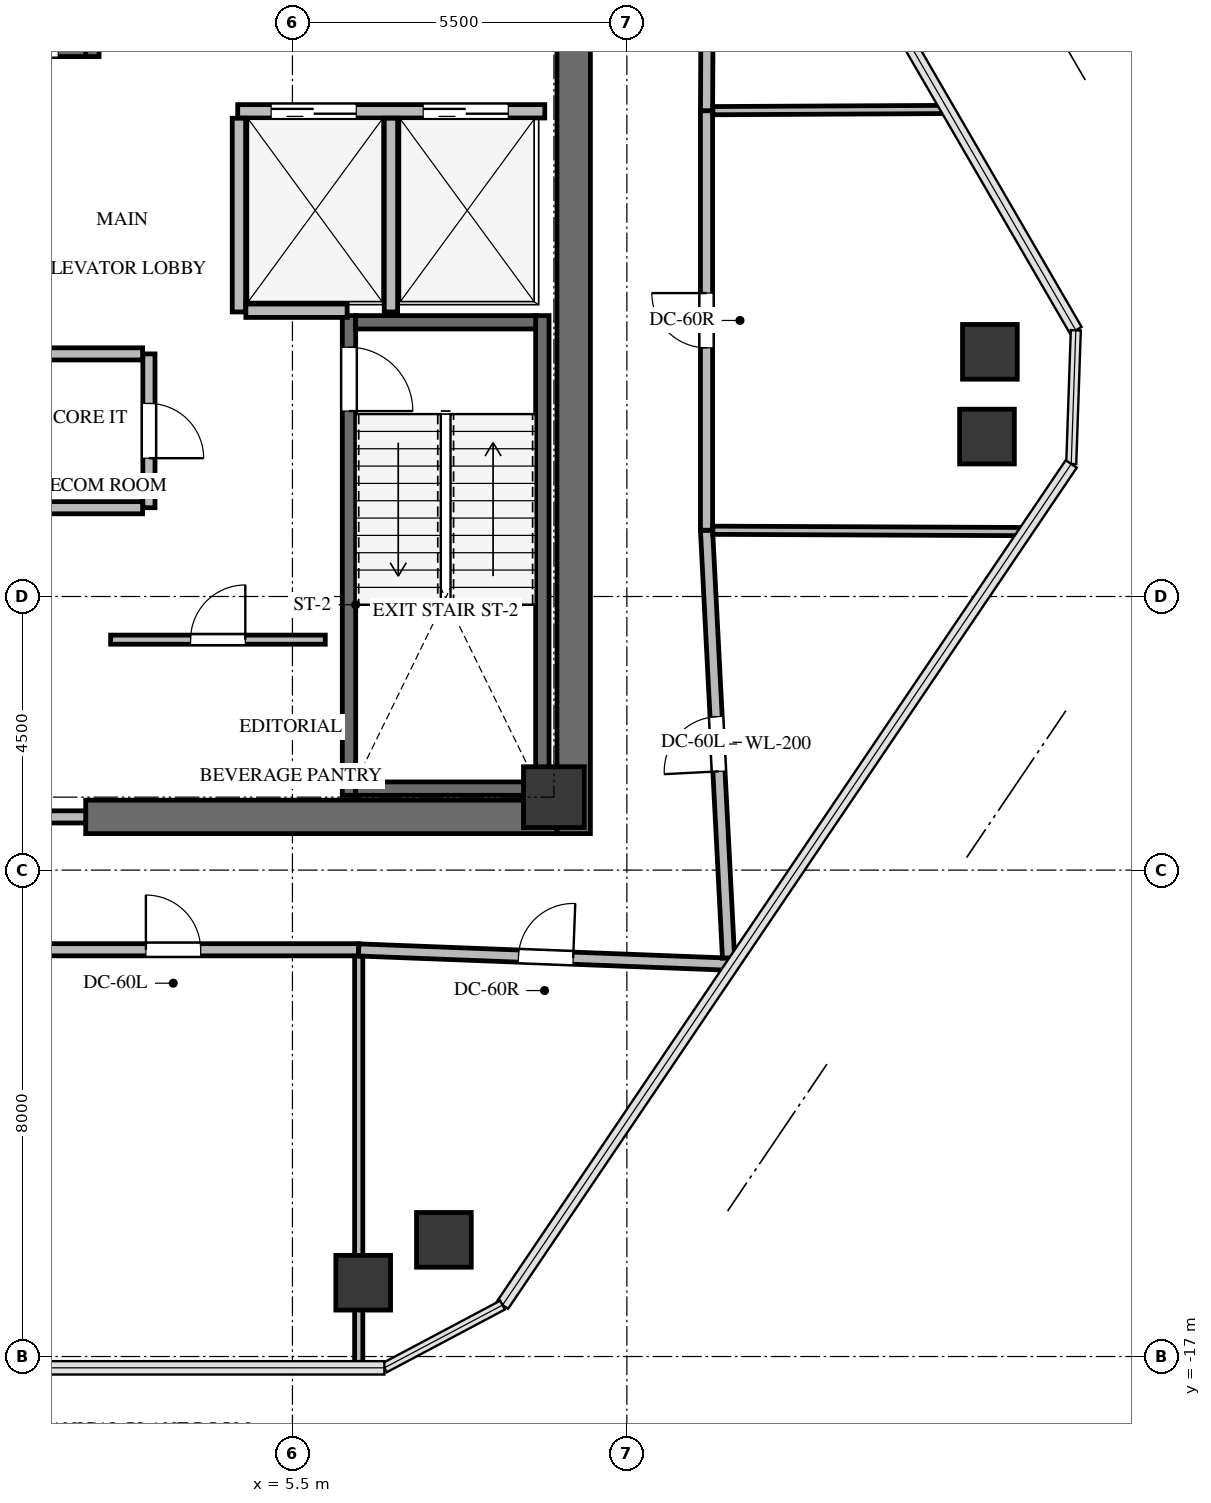
"""IFC4 building model, lengths in metres.
Left out: names, types, materials, properties, quantities, classifications, styles, units other than length and angle.
Written with IfcOpenShell. Run it as: python <this file> out.ifc"""

import sys

from ifc_helpers import new_model, si_unit, direction, frame, frame_2d, origin, origin_2d, place, context, subcontext, project, spatial, rectangle, extrude, source, transform, mapped, element, fill, save


model = new_model("IFC4")
c1 = context("Model", 3, precision=1e-05, world=origin(), true_north=direction((0.0, 1.0)))
c2 = subcontext(c1, "Body", "Model", "MODEL_VIEW")
j1 = project(units=[si_unit("LENGTHUNIT", "METRE"), si_unit("PLANEANGLEUNIT", "RADIAN")], contexts=[c1])
p1 = place(None, origin())
s1 = spatial("IfcSite", under=j1, at=p1, CompositionType="ELEMENT")
p2 = place(p1, origin())
s2 = spatial("IfcBuilding", under=s1, at=p2, CompositionType="ELEMENT")
p3 = place(p2, frame((0.0, 0.0, 268.3)))
s3 = spatial("IfcBuildingStorey", under=s2, at=p3, CompositionType="ELEMENT", Elevation=268.3)
p4 = place(p3, frame((10.125, -8.4, 0.0), z_axis=(0.0, 0.0, 1.0), x_axis=(0.0, 1.0, 0.0)))
e1 = element("IfcWall", 1, at=p4, inside=s3, PredefinedType="SHEAR", context=c2, shape_type="SweptSolid", body=[
    extrude(rectangle(XDim=16.8, YDim=0.55, at=frame_2d((8.4, 0.0))), origin(), (0.0, 0.0, 1.0), 4.2),
])
p5 = place(p3, frame((2.1, -8.125, 0.0), z_axis=(0.0, 0.0, 1.0), x_axis=(1.0, 0.0, 0.0)))
e2 = element("IfcWall", 2, at=p5, inside=s3, PredefinedType="SHEAR", context=c2, shape_type="SweptSolid", body=[
    extrude(rectangle(XDim=7.75, YDim=0.55, at=frame_2d((3.875, 0.0))), origin(), (0.0, 0.0, 1.0), 4.2),
])
p6 = place(p3, frame((9.61, -7.77, -0.3), z_axis=(0.0, 0.0, 1.0), x_axis=(0.0, 1.0, 0.0)))
e3 = element("IfcWall", 3, at=p6, inside=s3, PredefinedType="SHEAR", context=c2, shape_type="SweptSolid", body=[
    extrude(rectangle(XDim=7.89, YDim=0.22, at=frame_2d((3.945, 0.0))), origin(), (0.0, 0.0, 1.0), 4.05),
])
p7 = place(p3, frame((6.43, 0.12, -0.3), z_axis=(0.0, 0.0, 1.0), x_axis=(0.0, -1.0, 0.0)))
e4 = element("IfcWall", 4, at=p7, inside=s3, PredefinedType="SHEAR", context=c2, shape_type="SweptSolid", body=[
    extrude(rectangle(XDim=7.89, YDim=0.22, at=frame_2d((3.945, 0.0))), origin(), (0.0, 0.0, 1.0), 4.05),
])
p8 = place(p7, frame((0.52, 0.0, 0.0)))
e5 = element("IfcOpeningElement", 5, at=p8, cuts=e4, PredefinedType="OPENING", context=c2, shape_type="SweptSolid", body=[
    extrude(rectangle(XDim=1.05, YDim=2.15, at=frame_2d((0.525, 1.075))), frame((0.0, 0.12, 0.0), z_axis=(0.0, -1.0, 0.0), x_axis=(1.0, 0.0, 0.0)), (0.0, 0.0, 1.0), 0.24),
])
for number, where, z_axis, x_axis in (
    (6, (6.54, -7.66, -0.3), (0.0, 0.0, 1.0), (1.0, 0.0, 0.0)),
    (7, (9.5, 0.01, -0.3), (0.0, 0.0, 1.0), (-1.0, 0.0, 0.0)),
):
    element("IfcWall", number, at=place(p3, frame(where, z_axis=z_axis, x_axis=x_axis)), inside=s3, PredefinedType="SHEAR", context=c2, shape_type="SweptSolid", body=[
        extrude(rectangle(XDim=2.96, YDim=0.22, at=frame_2d((1.48, 0.0))), origin(), (0.0, 0.0, 1.0), 4.05),
    ])
p9 = place(p3, frame((2.21, 4.38, -0.3), z_axis=(0.0, 0.0, 1.0), x_axis=(0.0, 1.0, 0.0)))
e8 = element("IfcWall", 8, at=p9, inside=s3, PredefinedType="SHEAR", context=c2, shape_type="SweptSolid", body=[
    extrude(rectangle(XDim=3.4, YDim=0.22, at=frame_2d((1.7, 0.0))), origin(), (0.0, 0.0, 1.0), 4.05),
])
p10 = place(p3, frame((-5.25, 4.49, -0.3), z_axis=(0.0, 0.0, 1.0), x_axis=(1.0, 0.0, 0.0)))
e9 = element("IfcWall", 9, at=p10, inside=s3, PredefinedType="SHEAR", context=c2, shape_type="SweptSolid", body=[
    extrude(rectangle(XDim=7.35, YDim=0.22, at=frame_2d((3.675, 0.0))), origin(), (0.0, 0.0, 1.0), 4.05),
])
p11 = place(p10, frame((5.85, 0.0, 0.0)))
e10 = element("IfcOpeningElement", 10, at=p11, cuts=e9, PredefinedType="OPENING", context=c2, shape_type="SweptSolid", body=[
    extrude(rectangle(XDim=1.05, YDim=2.15, at=frame_2d((0.525, 1.075))), frame((0.0, 0.12, 0.0), z_axis=(0.0, -1.0, 0.0), x_axis=(1.0, 0.0, 0.0)), (0.0, 0.0, 1.0), 0.24),
])
m1 = source(origin(), c2, "Body", "SweptSolid", [
    extrude(rectangle(XDim=1.0, YDim=1.0, at=origin_2d()), origin(), (0.0, 0.0, 1.0), 4.05),
])
p12 = place(p3, frame((9.8, -7.8, -0.3), z_axis=(0.0, 0.0, 1.0), x_axis=(1.0, 0.0, 0.0)))
e11 = element("IfcColumn", 11, at=p12, inside=s3, PredefinedType="COLUMN", context=c2, shape_type="MappedRepresentation", body=[
    mapped(m1, transform((0.0, 0.0, 0.0), x_axis=(1.0, 0.0, 0.0), y_axis=(0.0, 1.0, 0.0), z_axis=(0.0, 0.0, 1.0), scale=1.0)),
])
m2 = source(origin(), c2, "Body", "SweptSolid", [
    extrude(rectangle(XDim=0.9, YDim=0.9, at=origin_2d()), origin(), (0.0, 0.0, 1.0), 4.05),
])
for number, where, z_axis, x_axis in (
    (12, (16.97, -0.476, -0.3), (0.0, 0.0, 1.0), (1.0, 0.0, 0.0)),
    (13, (16.922, -1.87, -0.3), (0.0, 0.0, 1.0), (1.0, 0.0, 0.0)),
    (14, (7.991, -15.081, -0.3), (0.0, 0.0, 1.0), (1.0, 0.0, 0.0)),
    (15, (6.664, -15.786, -0.3), (0.0, 0.0, 1.0), (1.0, 0.0, 0.0)),
):
    element("IfcColumn", number, at=place(p3, frame(where, z_axis=z_axis, x_axis=x_axis)), inside=s3, PredefinedType="COLUMN", context=c2, shape_type="MappedRepresentation", body=[
        mapped(m2, transform((0.0, 0.0, 0.0), x_axis=(1.0, 0.0, 0.0), y_axis=(0.0, 1.0, 0.0), z_axis=(0.0, 0.0, 1.0), scale=1.0)),
    ])
p13 = place(p3, frame((-2.1, -8.125, 0.0), z_axis=(0.0, 0.0, 1.0), x_axis=(1.0, 0.0, 0.0)))
e16 = element("IfcWall", 16, at=p13, inside=s3, PredefinedType="SOLIDWALL", context=c2, shape_type="SweptSolid", body=[
    extrude(rectangle(XDim=4.2, YDim=0.2, at=frame_2d((2.1, 0.0))), origin(), (0.0, 0.0, 1.0), 3.735),
])
p14 = place(p13, frame((1.2, 0.0, 0.0)))
e17 = element("IfcOpeningElement", 17, at=p14, cuts=e16, PredefinedType="OPENING", context=c2, shape_type="SweptSolid", body=[
    extrude(rectangle(XDim=1.8, YDim=2.15, at=frame_2d((0.9, 1.075))), frame((0.0, 0.11, 0.0), z_axis=(0.0, -1.0, 0.0), x_axis=(1.0, 0.0, 0.0)), (0.0, 0.0, 1.0), 0.22),
])
p15 = place(p3, frame((4.6, 3.48, 0.0), z_axis=(0.0, 0.0, 1.0), x_axis=(1.0, 0.0, 0.0)))
e18 = element("IfcWall", 18, at=p15, inside=s3, PredefinedType="SOLIDWALL", context=c2, shape_type="SweptSolid", body=[
    extrude(rectangle(XDim=5.05, YDim=0.22, at=frame_2d((2.525, 0.0))), origin(), (0.0, 0.0, 1.0), 3.735),
])
p16 = place(p15, frame((0.55, 0.0, 0.0)))
e19 = element("IfcOpeningElement", 19, at=p16, cuts=e18, PredefinedType="OPENING", context=c2, shape_type="SweptSolid", body=[
    extrude(rectangle(XDim=1.4, YDim=2.15, at=frame_2d((0.7, 1.075))), frame((0.0, 0.12, 0.0), z_axis=(0.0, -1.0, 0.0), x_axis=(1.0, 0.0, 0.0)), (0.0, 0.0, 1.0), 0.24),
])
p17 = place(p15, frame((3.05, 0.0, 0.0)))
e20 = element("IfcOpeningElement", 20, at=p17, cuts=e18, PredefinedType="OPENING", context=c2, shape_type="SweptSolid", body=[
    extrude(rectangle(XDim=1.4, YDim=2.15, at=frame_2d((0.7, 1.075))), frame((0.0, 0.12, 0.0), z_axis=(0.0, -1.0, 0.0), x_axis=(1.0, 0.0, 0.0)), (0.0, 0.0, 1.0), 0.24),
])
for number, where, z_axis, x_axis in (
    (21, (4.62, 0.18, 0.0), (0.0, 0.0, 1.0), (0.0, 1.0, 0.0)),
    (22, (7.12, 0.18, 0.0), (0.0, 0.0, 1.0), (0.0, 1.0, 0.0)),
):
    element("IfcWall", number, at=place(p3, frame(where, z_axis=z_axis, x_axis=x_axis)), inside=s3, PredefinedType="SOLIDWALL", context=c2, shape_type="SweptSolid", body=[
        extrude(rectangle(XDim=3.186, YDim=0.22, at=frame_2d((1.593, 0.0))), origin(), (0.0, 0.0, 1.0), 3.735),
    ])
p18 = place(p3, frame((4.734, 0.2, 0.0), z_axis=(0.0, 0.0, 1.0), x_axis=(1.0, 0.0, 0.0)))
e23 = element("IfcWall", 23, at=p18, inside=s3, PredefinedType="SOLIDWALL", context=c2, shape_type="SweptSolid", body=[
    extrude(rectangle(XDim=1.666, YDim=0.22, at=frame_2d((0.833, 0.0))), origin(), (0.0, 0.0, 1.0), 3.735),
])
p19 = place(p3, frame((2.51, -5.21, 0.0), z_axis=(0.0, 0.0, 1.0), x_axis=(1.0, 0.0, 0.0)))
e24 = element("IfcWall", 24, at=p19, inside=s3, PredefinedType="PARTITIONING", context=c2, shape_type="SweptSolid", body=[
    extrude(rectangle(XDim=3.53, YDim=0.15, at=frame_2d((1.765, 0.0))), origin(), (0.0, 0.0, 1.0), 3.735),
])
p20 = place(p19, frame((1.315, 0.0, 0.0)))
e25 = element("IfcOpeningElement", 25, at=p20, cuts=e24, PredefinedType="OPENING", context=c2, shape_type="SweptSolid", body=[
    extrude(rectangle(XDim=0.9, YDim=2.05, at=frame_2d((0.45, 1.025))), frame((0.0, 0.085, 0.0), z_axis=(0.0, -1.0, 0.0), x_axis=(1.0, 0.0, 0.0)), (0.0, 0.0, 1.0), 0.17),
])
p21 = place(p3, frame((3.14, -0.51, 0.0), z_axis=(0.0, 0.0, 1.0), x_axis=(0.0, -1.0, 0.0)))
e26 = element("IfcWall", 26, at=p21, inside=s3, PredefinedType="SOLIDWALL", context=c2, shape_type="SweptSolid", body=[
    extrude(rectangle(XDim=2.53, YDim=0.2, at=frame_2d((1.265, 0.0))), origin(), (0.0, 0.0, 1.0), 3.735),
])
p22 = place(p21, frame((0.815, 0.0, 0.0)))
e27 = element("IfcOpeningElement", 27, at=p22, cuts=e26, PredefinedType="OPENING", context=c2, shape_type="SweptSolid", body=[
    extrude(rectangle(XDim=0.9, YDim=2.05, at=frame_2d((0.45, 1.025))), frame((0.0, 0.11, 0.0), z_axis=(0.0, -1.0, 0.0), x_axis=(1.0, 0.0, 0.0)), (0.0, 0.0, 1.0), 0.22),
])
for number, where, z_axis, x_axis in (
    (28, (3.036, -3.04, 0.0), (0.0, 0.0, 1.0), (-1.0, 0.0, 0.0)),
    (29, (1.21, -0.51, 0.0), (0.0, 0.0, 1.0), (1.0, 0.0, 0.0)),
):
    element("IfcWall", number, at=place(p3, frame(where, z_axis=z_axis, x_axis=x_axis)), inside=s3, PredefinedType="SOLIDWALL", context=c2, shape_type="SweptSolid", body=[
        extrude(rectangle(XDim=1.826, YDim=0.2, at=frame_2d((0.913, 0.0))), origin(), (0.0, 0.0, 1.0), 3.735),
    ])
p23 = place(p3, frame((0.49, -10.31, 0.0), z_axis=(0.0, 0.0, 1.0), x_axis=(1.0, 0.0, 0.0)))
e30 = element("IfcWall", 30, at=p23, inside=s3, PredefinedType="SOLIDWALL", context=c2, shape_type="SweptSolid", body=[
    extrude(rectangle(XDim=6.1, YDim=0.2, at=frame_2d((3.05, 0.0))), origin(), (0.0, 0.0, 1.0), 2.32),
])
p24 = place(p23, frame((2.6, 0.0, 0.0)))
e31 = element("IfcOpeningElement", 31, at=p24, cuts=e30, PredefinedType="OPENING", context=c2, shape_type="SweptSolid", body=[
    extrude(rectangle(XDim=0.9, YDim=2.05, at=frame_2d((0.45, 1.025))), frame((0.0, 0.11, 0.0), z_axis=(0.0, -1.0, 0.0), x_axis=(1.0, 0.0, 0.0)), (0.0, 0.0, 1.0), 0.22),
])
p25 = place(p3, frame((6.59, -10.313, 0.0), z_axis=(0.0, 0.0, 1.0), x_axis=(0.999261994152, -0.038411808645, 0.0)))
e32 = element("IfcWall", 32, at=p25, inside=s3, PredefinedType="SOLIDWALL", context=c2, shape_type="SweptSolid", body=[
    extrude(rectangle(XDim=6.159, YDim=0.2, at=frame_2d((3.08, 0.0))), origin(), (0.0, 0.0, 1.0), 2.32),
])
p26 = place(p25, frame((2.629, 0.0, 0.0)))
e33 = element("IfcOpeningElement", 33, at=p26, cuts=e32, PredefinedType="OPENING", context=c2, shape_type="SweptSolid", body=[
    extrude(rectangle(XDim=0.9, YDim=2.05, at=frame_2d((0.45, 1.025))), frame((0.0, 0.11, 0.0), z_axis=(0.0, -1.0, 0.0), x_axis=(1.0, 0.0, 0.0)), (0.0, 0.0, 1.0), 0.22),
])
p27 = place(p3, frame((12.672, -10.443, 0.0), z_axis=(0.0, 0.0, 1.0), x_axis=(-0.051414240227, 0.998677413333, 0.0)))
e34 = element("IfcWall", 34, at=p27, inside=s3, PredefinedType="SOLIDWALL", context=c2, shape_type="SweptSolid", body=[
    extrude(rectangle(XDim=7.042, YDim=0.2, at=frame_2d((3.521, 0.0))), origin(), (0.0, 0.0, 1.0), 2.32),
])
p28 = place(p27, frame((3.071, 0.0, 0.0)))
e35 = element("IfcOpeningElement", 35, at=p28, cuts=e34, PredefinedType="OPENING", context=c2, shape_type="SweptSolid", body=[
    extrude(rectangle(XDim=0.9, YDim=2.05, at=frame_2d((0.45, 1.025))), frame((0.0, 0.11, 0.0), z_axis=(0.0, -1.0, 0.0), x_axis=(1.0, 0.0, 0.0)), (0.0, 0.0, 1.0), 0.22),
])
p29 = place(p3, frame((12.31, -3.41, 0.0), z_axis=(0.0, 0.0, 1.0), x_axis=(0.0, 1.0, 0.0)))
e36 = element("IfcWall", 36, at=p29, inside=s3, PredefinedType="SOLIDWALL", context=c2, shape_type="SweptSolid", body=[
    extrude(rectangle(XDim=6.9, YDim=0.2, at=frame_2d((3.45, 0.0))), origin(), (0.0, 0.0, 1.0), 3.093),
])
p30 = place(p29, frame((3.0, 0.0, 0.0)))
e37 = element("IfcOpeningElement", 37, at=p30, cuts=e36, PredefinedType="OPENING", context=c2, shape_type="SweptSolid", body=[
    extrude(rectangle(XDim=0.9, YDim=2.05, at=frame_2d((0.45, 1.025))), frame((0.0, 0.11, 0.0), z_axis=(0.0, -1.0, 0.0), x_axis=(1.0, 0.0, 0.0)), (0.0, 0.0, 1.0), 0.22),
])
p31 = place(p3, frame((12.31, 3.49, 0.0), z_axis=(0.0, 0.0, 1.0), x_axis=(0.005031021246, 0.999987344333, 0.0)))
e38 = element("IfcWall", 38, at=p31, inside=s3, PredefinedType="SOLIDWALL", context=c2, shape_type="SweptSolid", body=[
    extrude(rectangle(XDim=6.794, YDim=0.2, at=frame_2d((3.397, 0.0))), origin(), (0.0, 0.0, 1.0), 2.32),
])
p32 = place(p31, frame((2.947, 0.0, 0.0)))
e39 = element("IfcOpeningElement", 39, at=p32, cuts=e38, PredefinedType="OPENING", context=c2, shape_type="SweptSolid", body=[
    extrude(rectangle(XDim=0.9, YDim=2.05, at=frame_2d((0.45, 1.025))), frame((0.0, 0.11, 0.0), z_axis=(0.0, -1.0, 0.0), x_axis=(1.0, 0.0, 0.0)), (0.0, 0.0, 1.0), 0.22),
])
p33 = place(p3, frame((6.59, -10.417, 0.0), z_axis=(0.0, 0.0, 1.0), x_axis=(0.0, -1.0, 0.0)))
e40 = element("IfcWall", 40, at=p33, inside=s3, PredefinedType="PARTITIONING", context=c2, shape_type="SweptSolid", body=[
    extrude(rectangle(XDim=6.769, YDim=0.135, at=frame_2d((3.384, 0.0))), origin(), (0.0, 0.0, 1.0), 2.32),
])
p34 = place(p3, frame((12.744, -10.55, 0.0), z_axis=(0.0, 0.0, 1.0), x_axis=(0.56006489544, 0.828448738846, 0.0)))
e41 = element("IfcWall", 41, at=p34, inside=s3, PredefinedType="PARTITIONING", context=c2, shape_type="SweptSolid", body=[
    extrude(rectangle(XDim=0.262, YDim=0.135, at=frame_2d((0.131, 0.0))), origin(), (0.0, 0.0, 1.0), 3.735),
])
p35 = place(p3, frame((12.414, -3.41, 0.0), z_axis=(0.0, 0.0, 1.0), x_axis=(0.999990868706, -0.004273465251, 0.0)))
e42 = element("IfcWall", 42, at=p35, inside=s3, PredefinedType="PARTITIONING", context=c2, shape_type="SweptSolid", body=[
    extrude(rectangle(XDim=5.142, YDim=0.135, at=frame_2d((2.571, 0.0))), origin(), (0.0, 0.0, 1.0), 2.32),
])
p36 = place(p3, frame((12.414, 3.49, 0.0), z_axis=(0.0, 0.0, 1.0), x_axis=(0.999987207709, 0.005058104237, 0.0)))
e43 = element("IfcWall", 43, at=p36, inside=s3, PredefinedType="PARTITIONING", context=c2, shape_type="SweptSolid", body=[
    extrude(rectangle(XDim=3.861, YDim=0.135, at=frame_2d((1.931, 0.0))), origin(), (0.0, 0.0, 1.0), 2.32),
])
m3 = source(origin(), c2, "Body", "SweptSolid", [
    extrude(rectangle(XDim=1.05, YDim=2.15, at=frame_2d((0.525, 1.075))), frame((0.0, 0.025, 0.0), z_axis=(0.0, -1.0, 0.0), x_axis=(1.0, 0.0, 0.0)), (0.0, 0.0, 1.0), 0.05),
])
p37 = place(p8, origin())
e44 = element("IfcDoor", 44, at=p37, inside=s3, OperationType="SINGLE_SWING_RIGHT", PredefinedType="DOOR", context=c2, shape_type="MappedRepresentation", body=[
    mapped(m3, transform((0.0, 0.0, 0.0), x_axis=(1.0, 0.0, 0.0), y_axis=(0.0, 1.0, 0.0), z_axis=(0.0, 0.0, 1.0), scale=1.0)),
])
fill(e5, e44)
m4 = source(origin(), c2, "Body", "SweptSolid", [
    extrude(rectangle(XDim=1.4, YDim=2.15, at=frame_2d((0.7, 1.075))), frame((0.0, 0.025, 0.0), z_axis=(0.0, -1.0, 0.0), x_axis=(1.0, 0.0, 0.0)), (0.0, 0.0, 1.0), 0.05),
])
p38 = place(p16, origin())
e45 = element("IfcDoor", 45, at=p38, inside=s3, OperationType="DOUBLE_DOOR_SLIDING", PredefinedType="DOOR", context=c2, shape_type="MappedRepresentation", body=[
    mapped(m4, transform((0.0, 0.0, 0.0), x_axis=(1.0, 0.0, 0.0), y_axis=(0.0, 1.0, 0.0), z_axis=(0.0, 0.0, 1.0), scale=1.0)),
])
fill(e19, e45)
p39 = place(p17, origin())
e46 = element("IfcDoor", 46, at=p39, inside=s3, OperationType="DOUBLE_DOOR_SLIDING", PredefinedType="DOOR", context=c2, shape_type="MappedRepresentation", body=[
    mapped(m4, transform((0.0, 0.0, 0.0), x_axis=(1.0, 0.0, 0.0), y_axis=(0.0, 1.0, 0.0), z_axis=(0.0, 0.0, 1.0), scale=1.0)),
])
fill(e20, e46)
m5 = source(origin(), c2, "Body", "SweptSolid", [
    extrude(rectangle(XDim=0.9, YDim=2.05, at=frame_2d((0.45, 1.025))), frame((0.0, 0.025, 0.0), z_axis=(0.0, -1.0, 0.0), x_axis=(1.0, 0.0, 0.0)), (0.0, 0.0, 1.0), 0.05),
])
p40 = place(p20, origin())
e47 = element("IfcDoor", 47, at=p40, inside=s3, OperationType="SINGLE_SWING_RIGHT", PredefinedType="DOOR", context=c2, shape_type="MappedRepresentation", body=[
    mapped(m5, transform((0.0, 0.0, 0.0), x_axis=(1.0, 0.0, 0.0), y_axis=(0.0, 1.0, 0.0), z_axis=(0.0, 0.0, 1.0), scale=1.0)),
])
fill(e25, e47)
p41 = place(p22, origin())
e48 = element("IfcDoor", 48, at=p41, inside=s3, OperationType="SINGLE_SWING_RIGHT", PredefinedType="DOOR", context=c2, shape_type="MappedRepresentation", body=[
    mapped(m5, transform((0.0, 0.0, 0.0), x_axis=(1.0, 0.0, 0.0), y_axis=(0.0, 1.0, 0.0), z_axis=(0.0, 0.0, 1.0), scale=1.0)),
])
fill(e27, e48)
m6 = source(origin(), c2, "Body", "SweptSolid", [
    extrude(rectangle(XDim=0.9, YDim=2.05, at=frame_2d((0.45, 1.025))), frame((0.0, 0.025, 0.0), z_axis=(0.0, -1.0, 0.0), x_axis=(1.0, 0.0, 0.0)), (0.0, 0.0, 1.0), 0.05),
])
p42 = place(p24, origin())
e49 = element("IfcDoor", 49, at=p42, inside=s3, OperationType="SINGLE_SWING_LEFT", PredefinedType="DOOR", context=c2, shape_type="MappedRepresentation", body=[
    mapped(m6, transform((0.0, 0.0, 0.0), x_axis=(1.0, 0.0, 0.0), y_axis=(0.0, 1.0, 0.0), z_axis=(0.0, 0.0, 1.0), scale=1.0)),
])
fill(e31, e49)
p43 = place(p26, origin())
e50 = element("IfcDoor", 50, at=p43, inside=s3, OperationType="SINGLE_SWING_RIGHT", PredefinedType="DOOR", context=c2, shape_type="MappedRepresentation", body=[
    mapped(m5, transform((0.0, 0.0, 0.0), x_axis=(1.0, 0.0, 0.0), y_axis=(0.0, 1.0, 0.0), z_axis=(0.0, 0.0, 1.0), scale=1.0)),
])
fill(e33, e50)
p44 = place(p28, origin())
e51 = element("IfcDoor", 51, at=p44, inside=s3, OperationType="SINGLE_SWING_LEFT", PredefinedType="DOOR", context=c2, shape_type="MappedRepresentation", body=[
    mapped(m6, transform((0.0, 0.0, 0.0), x_axis=(1.0, 0.0, 0.0), y_axis=(0.0, 1.0, 0.0), z_axis=(0.0, 0.0, 1.0), scale=1.0)),
])
fill(e35, e51)
p45 = place(p30, origin())
e52 = element("IfcDoor", 52, at=p45, inside=s3, OperationType="SINGLE_SWING_RIGHT", PredefinedType="DOOR", context=c2, shape_type="MappedRepresentation", body=[
    mapped(m5, transform((0.0, 0.0, 0.0), x_axis=(1.0, 0.0, 0.0), y_axis=(0.0, 1.0, 0.0), z_axis=(0.0, 0.0, 1.0), scale=1.0)),
])
fill(e37, e52)
save(model, sys.argv[1])
